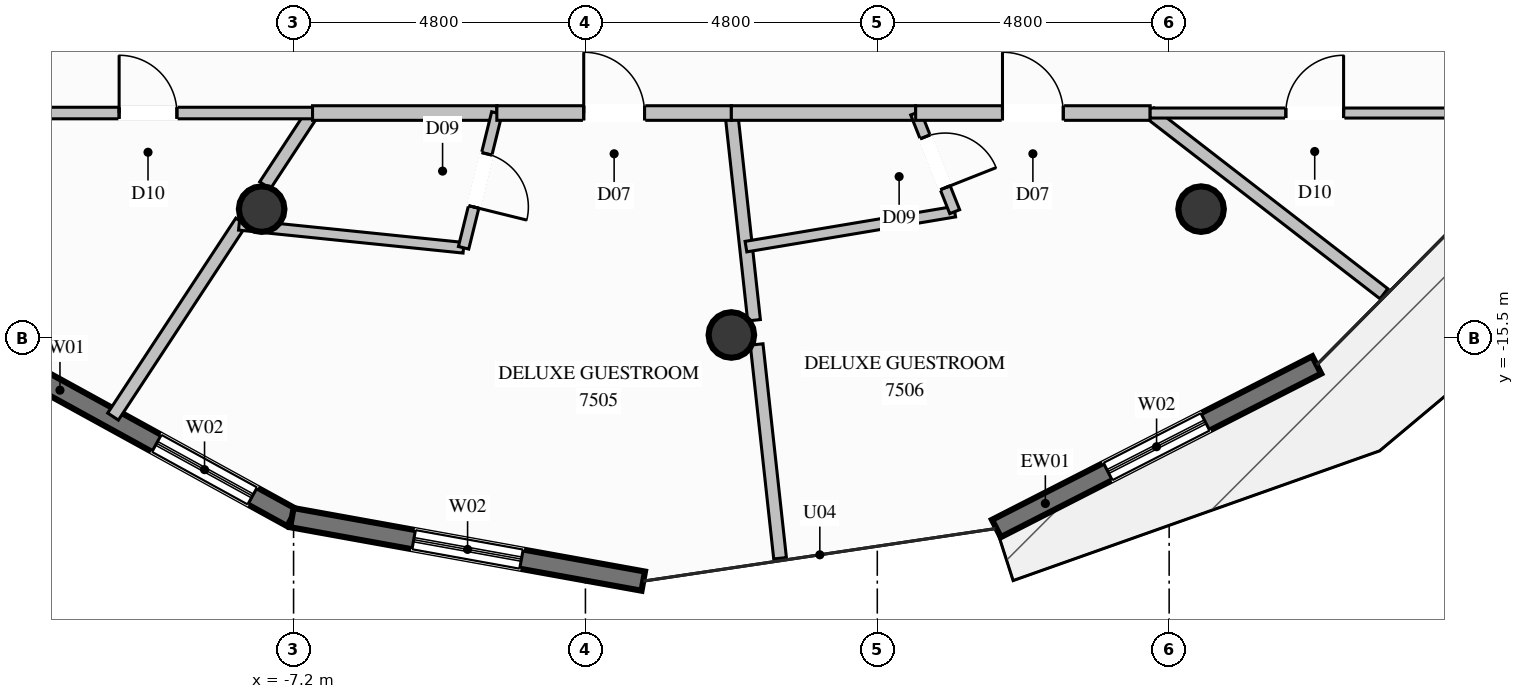
"""IFC4 building model, lengths in metres.
Left out: names, types, materials, properties, quantities, classifications, styles, units other than length and angle.
Written with IfcOpenShell. Run it as: python <this file> out.ifc"""

import sys

from ifc_helpers import new_model, si_unit, direction, frame, frame_2d, origin, origin_2d, place, context, subcontext, project, spatial, rectangle, circle, extrude, element, fill, save


model = new_model("IFC4")
c1 = context("Model", 3, precision=1e-05, world=origin(), true_north=direction((0.0, 1.0)))
c2 = subcontext(c1, "Body", "Model", "MODEL_VIEW")
j1 = project(units=[si_unit("LENGTHUNIT", "METRE"), si_unit("PLANEANGLEUNIT", "RADIAN")], contexts=[c1])
p1 = place(None, origin())
s1 = spatial("IfcSite", under=j1, at=p1, CompositionType="ELEMENT")
p2 = place(p1, origin())
s2 = spatial("IfcBuilding", under=s1, at=p2, CompositionType="ELEMENT")
p3 = place(p2, frame((0.0, 0.0, 282.0)))
s3 = spatial("IfcBuildingStorey", under=s2, at=p3, CompositionType="ELEMENT", Elevation=282.0)
for number, where, z_axis, x_axis in (
    (1, (-7.725, -13.38, 0.0), (0.0, 0.0, 1.0), (1.0, 0.0, 0.0)),
    (2, (0.0, -15.45, 0.0), (0.0, 0.0, 1.0), (1.0, 0.0, 0.0)),
    (3, (7.725, -13.38, 0.0), (0.0, 0.0, 1.0), (1.0, 0.0, 0.0)),
):
    element("IfcColumn", number, at=place(p3, frame(where, z_axis=z_axis, x_axis=x_axis)), inside=s3, PredefinedType="COLUMN", context=c2, shape_type="SweptSolid", body=[
        extrude(circle(Radius=0.375, at=origin_2d()), origin(), (0.0, 0.0, 1.0), 3.8),
    ])
p4 = place(p3, frame((9.627, -15.943, 0.0), z_axis=(0.0, 0.0, 1.0), x_axis=(-0.890681374573, -0.454628077651, 0.0)))
e4 = element("IfcWall", 4, at=p4, inside=s3, PredefinedType="SOLIDWALL", context=c2, shape_type="SweptSolid", body=[
    extrude(rectangle(XDim=5.915, YDim=0.32, at=frame_2d((2.957, 0.0))), origin(), (0.0, 0.0, 1.0), 3.57),
])
p5 = place(p4, frame((2.057, 0.0, 0.35)))
e5 = element("IfcOpeningElement", 5, at=p5, cuts=e4, PredefinedType="OPENING", context=c2, shape_type="SweptSolid", body=[
    extrude(rectangle(XDim=1.8, YDim=2.6, at=frame_2d((0.9, 1.3))), frame((0.0, 0.17, 0.0), z_axis=(0.0, -1.0, 0.0), x_axis=(1.0, 0.0, 0.0)), (0.0, 0.0, 1.0), 0.34),
])
p6 = place(p3, frame((-7.228, -18.454, 0.0), z_axis=(0.0, 0.0, 1.0), x_axis=(-0.876367486065, 0.481643051822, 0.0)))
e6 = element("IfcWall", 6, at=p6, inside=s3, PredefinedType="SOLIDWALL", context=c2, shape_type="SweptSolid", body=[
    extrude(rectangle(XDim=5.916, YDim=0.32, at=frame_2d((2.958, 0.0))), origin(), (0.0, 0.0, 1.0), 3.57),
])
p7 = place(p6, frame((0.739, 0.0, 0.35)))
e7 = element("IfcOpeningElement", 7, at=p7, cuts=e6, PredefinedType="OPENING", context=c2, shape_type="SweptSolid", body=[
    extrude(rectangle(XDim=1.8, YDim=2.6, at=frame_2d((0.9, 1.3))), frame((0.0, 0.17, 0.0), z_axis=(0.0, -1.0, 0.0), x_axis=(1.0, 0.0, 0.0)), (0.0, 0.0, 1.0), 0.34),
])
p8 = place(p3, frame((-1.449, -19.498, 0.0), z_axis=(0.0, 0.0, 1.0), x_axis=(-0.984072814276, 0.177765846557, 0.0)))
e8 = element("IfcWall", 8, at=p8, inside=s3, PredefinedType="SOLIDWALL", context=c2, shape_type="SweptSolid", body=[
    extrude(rectangle(XDim=5.873, YDim=0.32, at=frame_2d((2.936, 0.0))), origin(), (0.0, 0.0, 1.0), 3.57),
])
p9 = place(p8, frame((2.036, 0.0, 0.35)))
e9 = element("IfcOpeningElement", 9, at=p9, cuts=e8, PredefinedType="OPENING", context=c2, shape_type="SweptSolid", body=[
    extrude(rectangle(XDim=1.8, YDim=2.6, at=frame_2d((0.9, 1.3))), frame((0.0, 0.17, 0.0), z_axis=(0.0, -1.0, 0.0), x_axis=(1.0, 0.0, 0.0)), (0.0, 0.0, 1.0), 0.34),
])
p10 = place(p3, frame((-6.888, -11.8, 0.0), z_axis=(0.0, 0.0, 1.0), x_axis=(-0.549023768368, -0.835806737091, 0.0)))
e10 = element("IfcWall", 10, at=p10, inside=s3, PredefinedType="PARTITIONING", context=c2, shape_type="SweptSolid", body=[
    extrude(rectangle(XDim=1.423, YDim=0.21, at=frame_2d((0.711, 0.0))), origin(), (0.0, 0.0, 1.0), 3.085),
])
p11 = place(p3, frame((-8.062, -13.586, 0.0), z_axis=(0.0, 0.0, 1.0), x_axis=(-0.549195664532, -0.835693796829, 0.0)))
e11 = element("IfcWall", 11, at=p11, inside=s3, PredefinedType="PARTITIONING", context=c2, shape_type="SweptSolid", body=[
    extrude(rectangle(XDim=3.836, YDim=0.21, at=frame_2d((1.918, 0.0))), origin(), (0.0, 0.0, 1.0), 3.57),
])
p12 = place(p3, frame((-11.278, -6.525, 0.0), z_axis=(0.0, 0.0, 1.0), x_axis=(-0.190197086903, -0.981745928504, 0.0)))
e12 = element("IfcWall", 12, at=p12, inside=s3, PredefinedType="PARTITIONING", context=c2, shape_type="SweptSolid", body=[
    extrude(rectangle(XDim=5.373, YDim=0.24, at=frame_2d((2.687, 0.0))), origin(), (0.0, 0.0, 1.0), 3.57),
])
p13 = place(p3, frame((-12.3, -11.8, 0.0), z_axis=(0.0, 0.0, 1.0), x_axis=(1.0, 0.0, 0.0)))
e13 = element("IfcWall", 13, at=p13, inside=s3, PredefinedType="PARTITIONING", context=c2, shape_type="SweptSolid", body=[
    extrude(rectangle(XDim=5.412, YDim=0.19, at=frame_2d((2.706, 0.0))), origin(), (0.0, 0.0, 1.0), 3.57),
])
p14 = place(p13, frame((2.231, 0.0, 0.0)))
e14 = element("IfcOpeningElement", 14, at=p14, cuts=e13, PredefinedType="OPENING", context=c2, shape_type="SweptSolid", body=[
    extrude(rectangle(XDim=0.95, YDim=2.1, at=frame_2d((0.475, 1.05))), frame((0.0, 0.105, 0.0), z_axis=(0.0, -1.0, 0.0), x_axis=(1.0, 0.0, 0.0)), (0.0, 0.0, 1.0), 0.21),
])
p15 = place(p3, frame((-6.888, -11.8, 0.0), z_axis=(0.0, 0.0, 1.0), x_axis=(1.0, 0.0, 0.0)))
e15 = element("IfcWall", 15, at=p15, inside=s3, PredefinedType="PARTITIONING", context=c2, shape_type="SweptSolid", body=[
    extrude(rectangle(XDim=3.031, YDim=0.24, at=frame_2d((1.516, 0.0))), origin(), (0.0, 0.0, 1.0), 3.57),
])
p16 = place(p3, frame((-8.096, -13.638, 0.0), z_axis=(0.0, 0.0, 1.0), x_axis=(0.994794612907, -0.101900334307, 0.0)))
e16 = element("IfcWall", 16, at=p16, inside=s3, PredefinedType="PLUMBINGWALL", context=c2, shape_type="SweptSolid", body=[
    extrude(rectangle(XDim=3.711, YDim=0.175, at=frame_2d((1.855, 0.0))), origin(), (0.0, 0.0, 1.0), 3.137),
])
p17 = place(p3, frame((-3.857, -11.8, 0.0), z_axis=(0.0, 0.0, 1.0), x_axis=(-0.239690783403, -0.970849281996, 0.0)))
e17 = element("IfcWall", 17, at=p17, inside=s3, PredefinedType="PLUMBINGWALL", context=c2, shape_type="SweptSolid", body=[
    extrude(rectangle(XDim=2.283, YDim=0.175, at=frame_2d((1.141, 0.0))), origin(), (0.0, 0.0, 1.0), 3.57),
])
p18 = place(p17, frame((0.691, 0.0, 0.0)))
e18 = element("IfcOpeningElement", 18, at=p18, cuts=e17, PredefinedType="OPENING", context=c2, shape_type="SweptSolid", body=[
    extrude(rectangle(XDim=0.9, YDim=2.1, at=frame_2d((0.45, 1.05))), frame((0.0, 0.098, 0.0), z_axis=(0.0, -1.0, 0.0), x_axis=(1.0, 0.0, 0.0)), (0.0, 0.0, 1.0), 0.195),
])
p19 = place(p3, frame((0.0, -11.8, 0.0), z_axis=(0.0, 0.0, 1.0), x_axis=(0.108813455261, -0.994062187166, 0.0)))
e19 = element("IfcWall", 19, at=p19, inside=s3, PredefinedType="PARTITIONING", context=c2, shape_type="SweptSolid", body=[
    extrude(rectangle(XDim=3.428, YDim=0.21, at=frame_2d((1.714, 0.0))), origin(), (0.0, 0.0, 1.0), 3.57),
])
p20 = place(p3, frame((0.416, -15.606, 0.0), z_axis=(0.0, 0.0, 1.0), x_axis=(0.108848082949, -0.994058396091, 0.0)))
e20 = element("IfcWall", 20, at=p20, inside=s3, PredefinedType="PARTITIONING", context=c2, shape_type="SweptSolid", body=[
    extrude(rectangle(XDim=3.537, YDim=0.21, at=frame_2d((1.769, 0.0))), origin(), (0.0, 0.0, 1.0), 3.57),
])
p21 = place(p3, frame((-3.857, -11.8, 0.0), z_axis=(0.0, 0.0, 1.0), x_axis=(1.0, 0.0, 0.0)))
e21 = element("IfcWall", 21, at=p21, inside=s3, PredefinedType="PARTITIONING", context=c2, shape_type="SweptSolid", body=[
    extrude(rectangle(XDim=3.857, YDim=0.24, at=frame_2d((1.928, 0.0))), origin(), (0.0, 0.0, 1.0), 3.57),
])
p22 = place(p21, frame((1.429, 0.0, 0.0)))
e22 = element("IfcOpeningElement", 22, at=p22, cuts=e21, PredefinedType="OPENING", context=c2, shape_type="SweptSolid", body=[
    extrude(rectangle(XDim=1.0, YDim=2.2, at=frame_2d((0.5, 1.1))), frame((0.0, 0.13, 0.0), z_axis=(0.0, -1.0, 0.0), x_axis=(1.0, 0.0, 0.0)), (0.0, 0.0, 1.0), 0.26),
])
p23 = place(p3, frame((0.0, -11.8, 0.0), z_axis=(0.0, 0.0, 1.0), x_axis=(1.0, 0.0, 0.0)))
e23 = element("IfcWall", 23, at=p23, inside=s3, PredefinedType="PARTITIONING", context=c2, shape_type="SweptSolid", body=[
    extrude(rectangle(XDim=3.031, YDim=0.24, at=frame_2d((1.516, 0.0))), origin(), (0.0, 0.0, 1.0), 3.57),
])
p24 = place(p3, frame((0.24, -13.997, 0.0), z_axis=(0.0, 0.0, 1.0), x_axis=(0.986264720431, 0.165172337976, 0.0)))
e24 = element("IfcWall", 24, at=p24, inside=s3, PredefinedType="PLUMBINGWALL", context=c2, shape_type="SweptSolid", body=[
    extrude(rectangle(XDim=3.481, YDim=0.175, at=frame_2d((1.74, 0.0))), origin(), (0.0, 0.0, 1.0), 3.57),
])
p25 = place(p3, frame((3.031, -11.8, 0.0), z_axis=(0.0, 0.0, 1.0), x_axis=(0.368058533414, -0.929802622055, 0.0)))
e25 = element("IfcWall", 25, at=p25, inside=s3, PredefinedType="PLUMBINGWALL", context=c2, shape_type="SweptSolid", body=[
    extrude(rectangle(XDim=1.745, YDim=0.175, at=frame_2d((0.872, 0.0))), origin(), (0.0, 0.0, 1.0), 3.57),
])
p26 = place(p25, frame((0.422, 0.0, 0.0)))
e26 = element("IfcOpeningElement", 26, at=p26, cuts=e25, PredefinedType="OPENING", context=c2, shape_type="SweptSolid", body=[
    extrude(rectangle(XDim=0.9, YDim=2.1, at=frame_2d((0.45, 1.05))), frame((0.0, 0.098, 0.0), z_axis=(0.0, -1.0, 0.0), x_axis=(1.0, 0.0, 0.0)), (0.0, 0.0, 1.0), 0.195),
])
p27 = place(p3, frame((6.888, -11.8, 0.0), z_axis=(0.0, 0.0, 1.0), x_axis=(0.79112916644, -0.61164911674, 0.0)))
e27 = element("IfcWall", 27, at=p27, inside=s3, PredefinedType="PARTITIONING", context=c2, shape_type="SweptSolid", body=[
    extrude(rectangle(XDim=4.859, YDim=0.21, at=frame_2d((2.429, 0.0))), origin(), (0.0, 0.0, 1.0), 3.57),
])
p28 = place(p3, frame((3.031, -11.8, 0.0), z_axis=(0.0, 0.0, 1.0), x_axis=(1.0, 0.0, 0.0)))
e28 = element("IfcWall", 28, at=p28, inside=s3, PredefinedType="PARTITIONING", context=c2, shape_type="SweptSolid", body=[
    extrude(rectangle(XDim=3.857, YDim=0.24, at=frame_2d((1.928, 0.0))), origin(), (0.0, 0.0, 1.0), 3.57),
])
p29 = place(p28, frame((1.428, 0.0, 0.0)))
e29 = element("IfcOpeningElement", 29, at=p29, cuts=e28, PredefinedType="OPENING", context=c2, shape_type="SweptSolid", body=[
    extrude(rectangle(XDim=1.0, YDim=2.2, at=frame_2d((0.5, 1.1))), frame((0.0, 0.13, 0.0), z_axis=(0.0, -1.0, 0.0), x_axis=(1.0, 0.0, 0.0)), (0.0, 0.0, 1.0), 0.26),
])
p30 = place(p3, frame((12.3, -11.8, 0.0), z_axis=(0.0, 0.0, 1.0), x_axis=(-0.243095426382, 0.970002378179, 0.0)))
e30 = element("IfcWall", 30, at=p30, inside=s3, PredefinedType="PARTITIONING", context=c2, shape_type="SweptSolid", body=[
    extrude(rectangle(XDim=5.438, YDim=0.24, at=frame_2d((2.719, 0.0))), origin(), (0.0, 0.0, 1.0), 3.57),
])
p31 = place(p3, frame((6.888, -11.8, 0.0), z_axis=(0.0, 0.0, 1.0), x_axis=(1.0, 0.0, 0.0)))
e31 = element("IfcWall", 31, at=p31, inside=s3, PredefinedType="PARTITIONING", context=c2, shape_type="SweptSolid", body=[
    extrude(rectangle(XDim=5.412, YDim=0.165, at=frame_2d((2.706, 0.0))), origin(), (0.0, 0.0, 1.0), 3.57),
])
p32 = place(p31, frame((2.231, 0.0, 0.0)))
e32 = element("IfcOpeningElement", 32, at=p32, cuts=e31, PredefinedType="OPENING", context=c2, shape_type="SweptSolid", body=[
    extrude(rectangle(XDim=0.95, YDim=2.1, at=frame_2d((0.475, 1.05))), frame((0.0, 0.093, 0.0), z_axis=(0.0, -1.0, 0.0), x_axis=(1.0, 0.0, 0.0)), (0.0, 0.0, 1.0), 0.185),
])
p33 = place(p5, origin())
e33 = element("IfcWindow", 33, at=p33, inside=s3, PartitioningType="SINGLE_PANEL", PredefinedType="WINDOW", context=c2, shape_type="SweptSolid", body=[
    extrude(rectangle(XDim=1.8, YDim=2.6, at=frame_2d((0.9, 1.3))), frame((0.0, 0.03, 0.0), z_axis=(0.0, -1.0, 0.0), x_axis=(1.0, 0.0, 0.0)), (0.0, 0.0, 1.0), 0.06),
])
fill(e5, e33)
p34 = place(p7, origin())
e34 = element("IfcWindow", 34, at=p34, inside=s3, PartitioningType="SINGLE_PANEL", PredefinedType="WINDOW", context=c2, shape_type="SweptSolid", body=[
    extrude(rectangle(XDim=1.8, YDim=2.6, at=frame_2d((0.9, 1.3))), frame((0.0, 0.03, 0.0), z_axis=(0.0, -1.0, 0.0), x_axis=(1.0, 0.0, 0.0)), (0.0, 0.0, 1.0), 0.06),
])
fill(e7, e34)
p35 = place(p9, origin())
e35 = element("IfcWindow", 35, at=p35, inside=s3, PartitioningType="SINGLE_PANEL", PredefinedType="WINDOW", context=c2, shape_type="SweptSolid", body=[
    extrude(rectangle(XDim=1.8, YDim=2.6, at=frame_2d((0.9, 1.3))), frame((0.0, 0.03, 0.0), z_axis=(0.0, -1.0, 0.0), x_axis=(1.0, 0.0, 0.0)), (0.0, 0.0, 1.0), 0.06),
])
fill(e9, e35)
p36 = place(p14, origin())
e36 = element("IfcDoor", 36, at=p36, inside=s3, OperationType="SINGLE_SWING_LEFT", PredefinedType="DOOR", context=c2, shape_type="SweptSolid", body=[
    extrude(rectangle(XDim=0.95, YDim=2.1, at=frame_2d((0.475, 1.05))), frame((0.0, 0.025, 0.0), z_axis=(0.0, -1.0, 0.0), x_axis=(1.0, 0.0, 0.0)), (0.0, 0.0, 1.0), 0.05),
])
fill(e14, e36)
p37 = place(p18, origin())
e37 = element("IfcDoor", 37, at=p37, inside=s3, OperationType="SINGLE_SWING_RIGHT", PredefinedType="DOOR", context=c2, shape_type="SweptSolid", body=[
    extrude(rectangle(XDim=0.9, YDim=2.1, at=frame_2d((0.45, 1.05))), frame((0.0, 0.025, 0.0), z_axis=(0.0, -1.0, 0.0), x_axis=(1.0, 0.0, 0.0)), (0.0, 0.0, 1.0), 0.05),
])
fill(e18, e37)
p38 = place(p22, origin())
e38 = element("IfcDoor", 38, at=p38, inside=s3, OperationType="SINGLE_SWING_LEFT", PredefinedType="DOOR", context=c2, shape_type="SweptSolid", body=[
    extrude(rectangle(XDim=1.0, YDim=2.2, at=frame_2d((0.5, 1.1))), frame((0.0, 0.025, 0.0), z_axis=(0.0, -1.0, 0.0), x_axis=(1.0, 0.0, 0.0)), (0.0, 0.0, 1.0), 0.05),
])
fill(e22, e38)
p39 = place(p26, origin())
e39 = element("IfcDoor", 39, at=p39, inside=s3, OperationType="SINGLE_SWING_RIGHT", PredefinedType="DOOR", context=c2, shape_type="SweptSolid", body=[
    extrude(rectangle(XDim=0.9, YDim=2.1, at=frame_2d((0.45, 1.05))), frame((0.0, 0.025, 0.0), z_axis=(0.0, -1.0, 0.0), x_axis=(1.0, 0.0, 0.0)), (0.0, 0.0, 1.0), 0.05),
])
fill(e26, e39)
p40 = place(p29, origin())
e40 = element("IfcDoor", 40, at=p40, inside=s3, OperationType="SINGLE_SWING_LEFT", PredefinedType="DOOR", context=c2, shape_type="SweptSolid", body=[
    extrude(rectangle(XDim=1.0, YDim=2.2, at=frame_2d((0.5, 1.1))), frame((0.0, 0.025, 0.0), z_axis=(0.0, -1.0, 0.0), x_axis=(1.0, 0.0, 0.0)), (0.0, 0.0, 1.0), 0.05),
])
fill(e29, e40)
p41 = place(p32, origin())
e41 = element("IfcDoor", 41, at=p41, inside=s3, OperationType="SINGLE_SWING_RIGHT", PredefinedType="DOOR", context=c2, shape_type="SweptSolid", body=[
    extrude(rectangle(XDim=0.95, YDim=2.1, at=frame_2d((0.475, 1.05))), frame((0.0, 0.025, 0.0), z_axis=(0.0, -1.0, 0.0), x_axis=(1.0, 0.0, 0.0)), (0.0, 0.0, 1.0), 0.05),
])
fill(e32, e41)
save(model, sys.argv[1])
